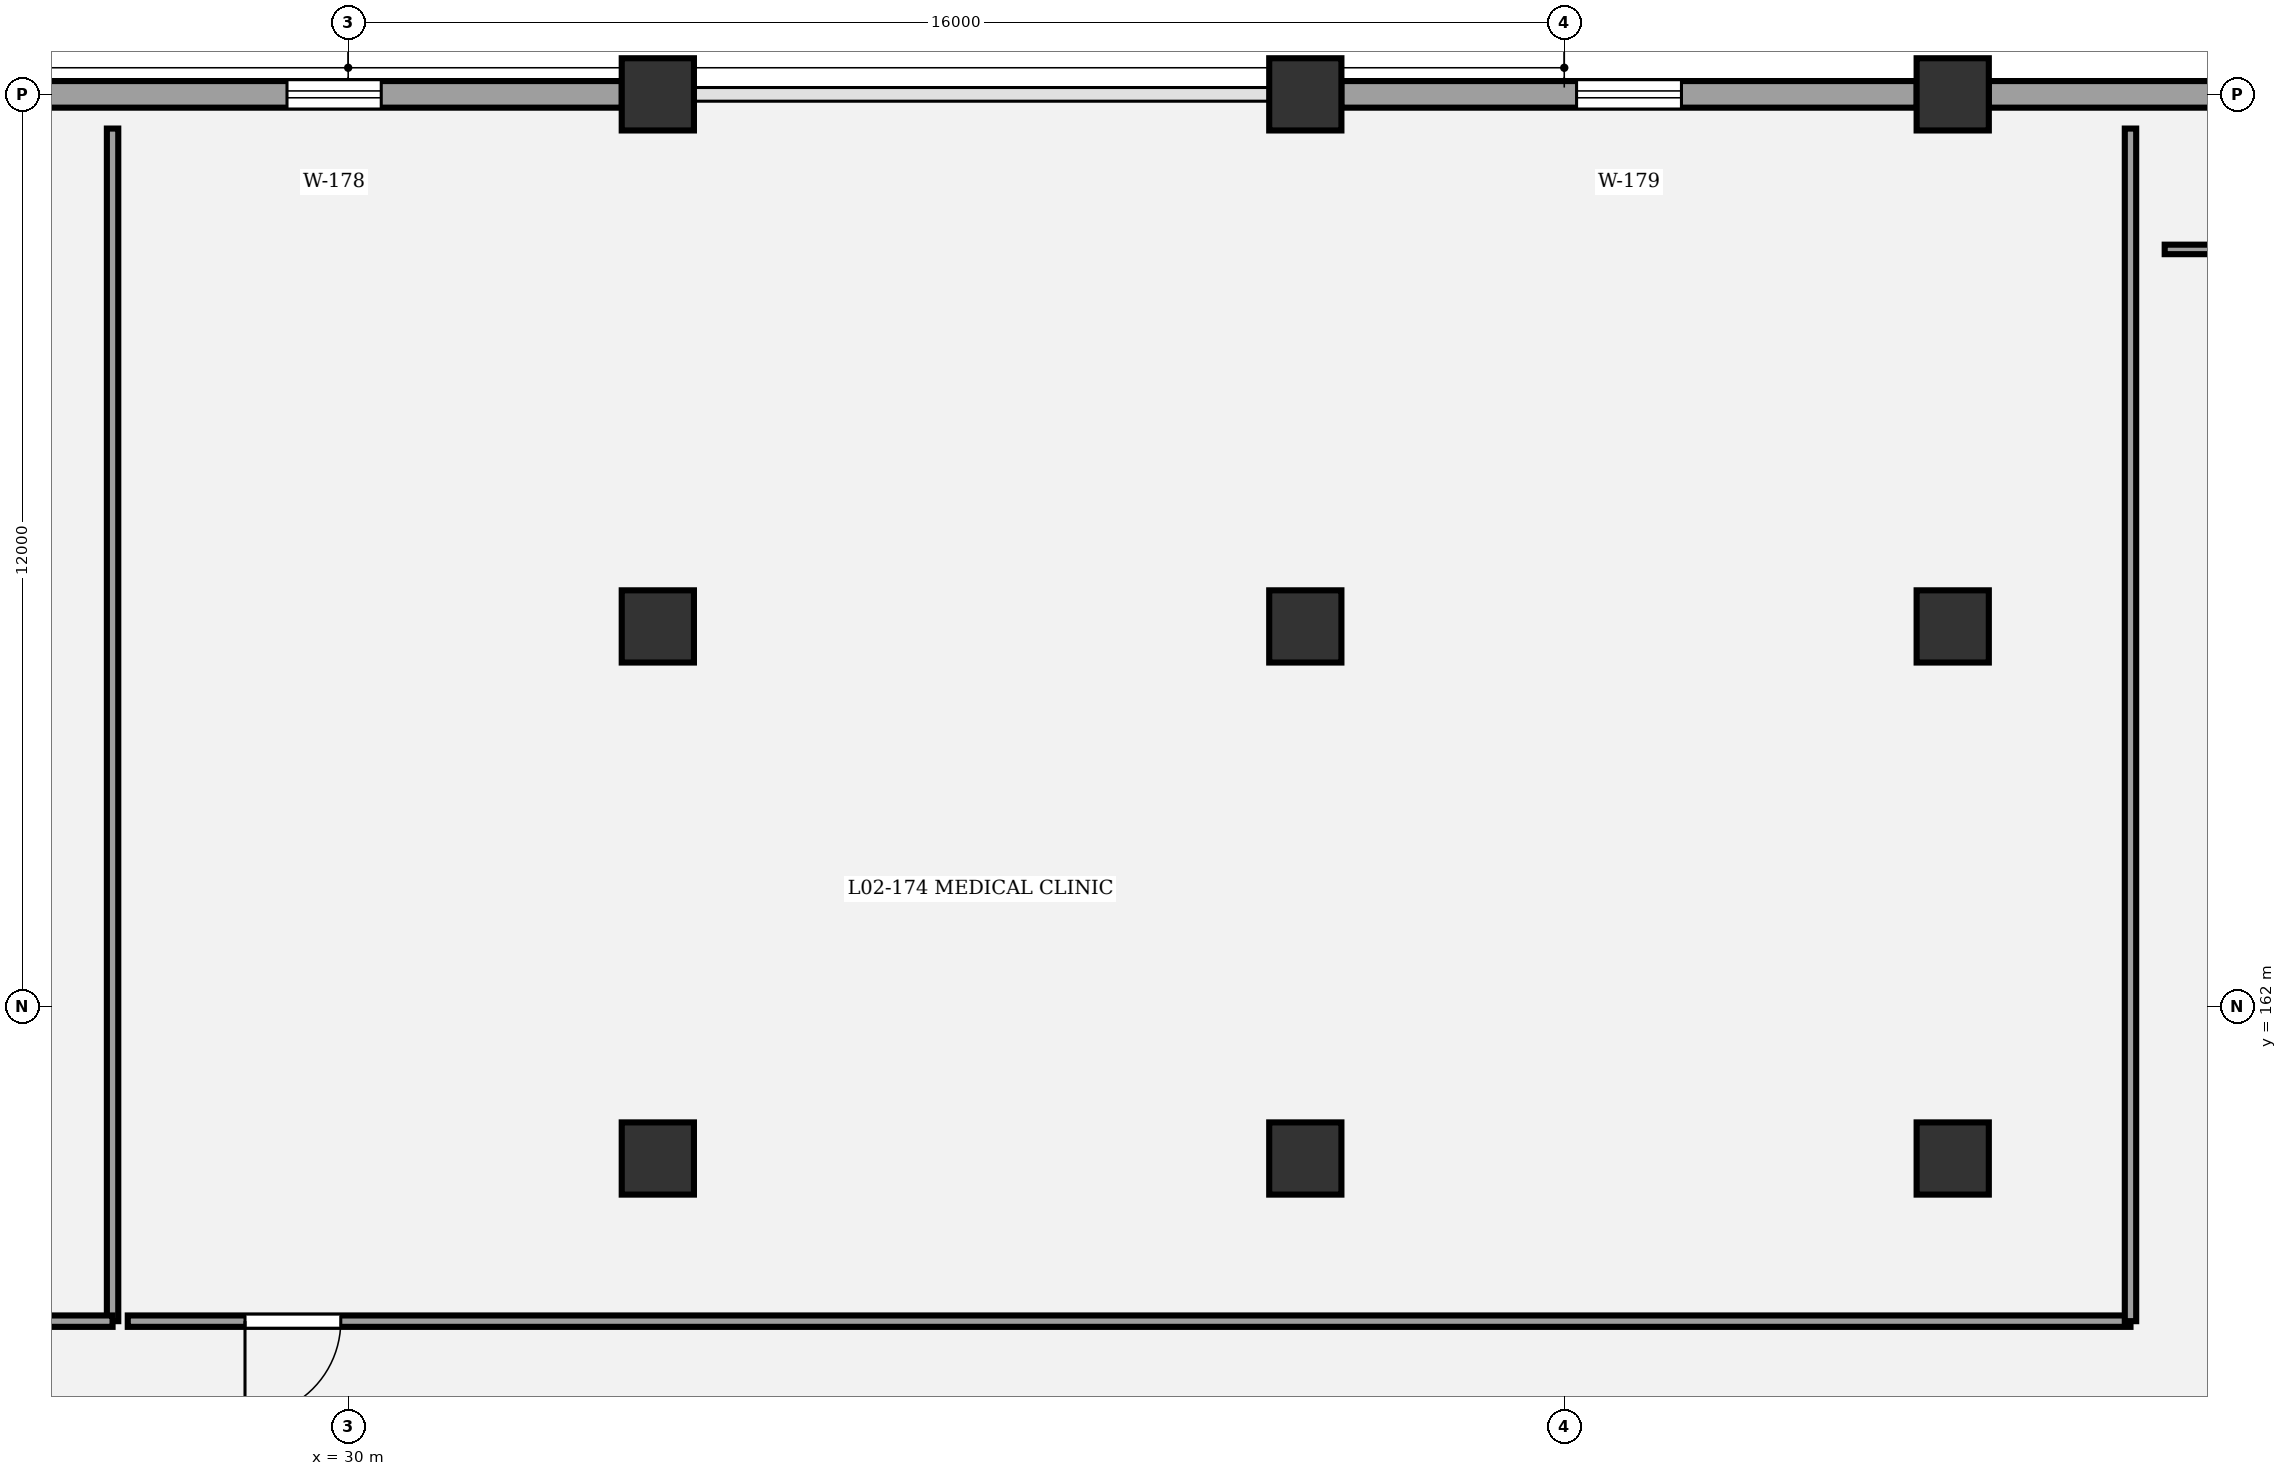
"""IFC4 building model, lengths in metres.
Left out: names, types, materials, properties, quantities, classifications, styles, units other than length and angle.
Written with IfcOpenShell. Run it as: python <this file> out.ifc"""

import sys

from ifc_helpers import new_model, si_unit, direction, frame, frame_2d, origin, origin_2d, place, context, subcontext, project, spatial, rectangle, circle, extrude, element, fill, save


model = new_model("IFC4")
c1 = context("Model", 3, precision=1e-05, world=origin(), true_north=direction((0.0, 1.0)))
c2 = subcontext(c1, "Body", "Model", "MODEL_VIEW")
j1 = project(units=[si_unit("LENGTHUNIT", "METRE"), si_unit("PLANEANGLEUNIT", "RADIAN")], contexts=[c1])
p1 = place(None, origin())
s1 = spatial("IfcSite", under=j1, at=p1, CompositionType="ELEMENT")
p2 = place(p1, origin())
s2 = spatial("IfcBuilding", under=s1, at=p2, CompositionType="ELEMENT")
p3 = place(p2, frame((0.0, 0.0, 10.2)))
s3 = spatial("IfcBuildingStorey", under=s2, at=p3, CompositionType="ELEMENT", Elevation=10.2)
for number, where, z_axis, x_axis in (
    (1, (34.074, 160.0, 0.0), (0.0, 0.0, 1.0), (1.0, 0.0, 0.0)),
    (2, (34.074, 167.0, 0.0), (0.0, 0.0, 1.0), (1.0, 0.0, 0.0)),
    (3, (34.074, 174.0, 0.0), (0.0, 0.0, 1.0), (1.0, 0.0, 0.0)),
    (4, (42.593, 160.0, 0.0), (0.0, 0.0, 1.0), (1.0, 0.0, 0.0)),
    (5, (42.593, 167.0, 0.0), (0.0, 0.0, 1.0), (1.0, 0.0, 0.0)),
    (6, (42.593, 174.0, 0.0), (0.0, 0.0, 1.0), (1.0, 0.0, 0.0)),
    (7, (51.111, 160.0, 0.0), (0.0, 0.0, 1.0), (1.0, 0.0, 0.0)),
    (8, (51.111, 167.0, 0.0), (0.0, 0.0, 1.0), (1.0, 0.0, 0.0)),
    (9, (51.111, 174.0, 0.0), (0.0, 0.0, 1.0), (1.0, 0.0, 0.0)),
):
    element("IfcColumn", number, at=place(p3, frame(where, z_axis=z_axis, x_axis=x_axis)), inside=s3, PredefinedType="COLUMN", context=c2, shape_type="SweptSolid", body=[
        extrude(circle(Radius=0.475, at=origin_2d()), origin(), (0.0, 0.0, 1.0), 4.5),
    ])
p4 = place(p3, frame((26.029, 174.0, 0.0), z_axis=(0.0, 0.0, 1.0), x_axis=(1.0, 0.0, 0.0)))
e10 = element("IfcWall", 10, at=p4, inside=s3, PredefinedType="STANDARD", context=c2, shape_type="SweptSolid", body=[
    extrude(rectangle(XDim=7.572, YDim=0.35, at=frame_2d((3.786, 0.0))), origin(), (0.0, 0.0, 1.0), 3.26),
])
p5 = place(p4, frame((3.166, 0.0, 0.9)))
e11 = element("IfcOpeningElement", 11, at=p5, cuts=e10, PredefinedType="OPENING", context=c2, shape_type="SweptSolid", body=[
    extrude(rectangle(XDim=1.24, YDim=1.55, at=frame_2d((0.62, 0.775))), frame((0.0, 0.185, 0.0), z_axis=(0.0, -1.0, 0.0), x_axis=(1.0, 0.0, 0.0)), (0.0, 0.0, 1.0), 0.37),
])
p6 = place(p3, frame((43.066, 174.0, 0.0), z_axis=(0.0, 0.0, 1.0), x_axis=(1.0, 0.0, 0.0)))
e12 = element("IfcWall", 12, at=p6, inside=s3, PredefinedType="STANDARD", context=c2, shape_type="SweptSolid", body=[
    extrude(rectangle(XDim=7.572, YDim=0.35, at=frame_2d((3.786, 0.0))), origin(), (0.0, 0.0, 1.0), 3.26),
])
p7 = place(p6, frame((3.096, 0.0, 0.9)))
e13 = element("IfcOpeningElement", 13, at=p7, cuts=e12, PredefinedType="OPENING", context=c2, shape_type="SweptSolid", body=[
    extrude(rectangle(XDim=1.38, YDim=1.55, at=frame_2d((0.69, 0.775))), frame((0.0, 0.185, 0.0), z_axis=(0.0, -1.0, 0.0), x_axis=(1.0, 0.0, 0.0)), (0.0, 0.0, 1.0), 0.37),
])
p8 = place(p3, frame((51.584, 174.0, 0.0), z_axis=(0.0, 0.0, 1.0), x_axis=(1.0, 0.0, 0.0)))
e14 = element("IfcWall", 14, at=p8, inside=s3, PredefinedType="STANDARD", context=c2, shape_type="SweptSolid", body=[
    extrude(rectangle(XDim=7.573, YDim=0.35, at=frame_2d((3.787, 0.0))), origin(), (0.0, 0.0, 1.0), 3.26),
])
p9 = place(p8, frame((3.027, 0.0, 0.9)))
e15 = element("IfcOpeningElement", 15, at=p9, cuts=e14, PredefinedType="OPENING", context=c2, shape_type="SweptSolid", body=[
    extrude(rectangle(XDim=1.52, YDim=1.55, at=frame_2d((0.76, 0.775))), frame((0.0, 0.185, 0.0), z_axis=(0.0, -1.0, 0.0), x_axis=(1.0, 0.0, 0.0)), (0.0, 0.0, 1.0), 0.37),
])
p10 = place(p3, frame((53.45, 157.86, 0.0), z_axis=(0.0, 0.0, 1.0), x_axis=(-1.0, 0.0, 0.0)))
e16 = element("IfcWall", 16, at=p10, inside=s3, PredefinedType="PARTITIONING", context=c2, shape_type="SweptSolid", body=[
    extrude(rectangle(XDim=26.35, YDim=0.15, at=frame_2d((13.175, 0.0))), origin(), (0.0, 0.0, 1.0), 3.25),
])
p11 = place(p10, frame((23.548, 0.0, 0.0)))
e17 = element("IfcOpeningElement", 17, at=p11, cuts=e16, PredefinedType="OPENING", context=c2, shape_type="SweptSolid", body=[
    extrude(rectangle(XDim=1.26, YDim=2.2, at=frame_2d((0.63, 1.1))), frame((0.0, 0.085, 0.0), z_axis=(0.0, -1.0, 0.0), x_axis=(1.0, 0.0, 0.0)), (0.0, 0.0, 1.0), 0.17),
])
p12 = place(p3, frame((80.0, 171.96, 0.0), z_axis=(0.0, 0.0, 1.0), x_axis=(-1.0, 0.0, 0.0)))
e18 = element("IfcWall", 18, at=p12, inside=s3, PredefinedType="PARTITIONING", context=c2, shape_type="SweptSolid", body=[
    extrude(rectangle(XDim=26.1, YDim=0.125, at=frame_2d((13.05, 0.0))), origin(), (0.0, 0.0, 1.0), 3.25),
])
p13 = place(p12, frame((15.959, 0.0, 0.0)))
e19 = element("IfcOpeningElement", 19, at=p13, cuts=e18, PredefinedType="OPENING", context=c2, shape_type="SweptSolid", body=[
    extrude(rectangle(XDim=1.4, YDim=2.2, at=frame_2d((0.7, 1.1))), frame((0.0, 0.073, 0.0), z_axis=(0.0, -1.0, 0.0), x_axis=(1.0, 0.0, 0.0)), (0.0, 0.0, 1.0), 0.145),
])
p14 = place(p3, frame((26.9, 173.55, 0.0), z_axis=(0.0, 0.0, 1.0), x_axis=(0.0, -1.0, 0.0)))
e20 = element("IfcWall", 20, at=p14, inside=s3, PredefinedType="PARTITIONING", context=c2, shape_type="SweptSolid", body=[
    extrude(rectangle(XDim=15.69, YDim=0.15, at=frame_2d((7.845, 0.0))), origin(), (0.0, 0.0, 1.0), 3.25),
])
p15 = place(p3, frame((26.9, 157.86, 0.0), z_axis=(0.0, 0.0, 1.0), x_axis=(-1.0, 0.0, 0.0)))
e21 = element("IfcWall", 21, at=p15, inside=s3, PredefinedType="PARTITIONING", context=c2, shape_type="SweptSolid", body=[
    extrude(rectangle(XDim=13.4, YDim=0.15, at=frame_2d((6.7, 0.0))), origin(), (0.0, 0.0, 1.0), 3.25),
])
p16 = place(p3, frame((53.45, 173.55, 0.0), z_axis=(0.0, 0.0, 1.0), x_axis=(0.0, -1.0, 0.0)))
e22 = element("IfcWall", 22, at=p16, inside=s3, PredefinedType="PARTITIONING", context=c2, shape_type="SweptSolid", body=[
    extrude(rectangle(XDim=15.69, YDim=0.15, at=frame_2d((7.845, 0.0))), origin(), (0.0, 0.0, 1.0), 3.25),
])
p17 = place(p5, origin())
e23 = element("IfcWindow", 23, at=p17, inside=s3, PartitioningType="SINGLE_PANEL", PredefinedType="WINDOW", context=c2, shape_type="SweptSolid", body=[
    extrude(rectangle(XDim=1.24, YDim=1.55, at=frame_2d((0.62, 0.775))), frame((0.0, 0.03, 0.0), z_axis=(0.0, -1.0, 0.0), x_axis=(1.0, 0.0, 0.0)), (0.0, 0.0, 1.0), 0.06),
])
fill(e11, e23)
p18 = place(p7, origin())
e24 = element("IfcWindow", 24, at=p18, inside=s3, PartitioningType="SINGLE_PANEL", PredefinedType="WINDOW", context=c2, shape_type="SweptSolid", body=[
    extrude(rectangle(XDim=1.38, YDim=1.55, at=frame_2d((0.69, 0.775))), frame((0.0, 0.03, 0.0), z_axis=(0.0, -1.0, 0.0), x_axis=(1.0, 0.0, 0.0)), (0.0, 0.0, 1.0), 0.06),
])
fill(e13, e24)
p19 = place(p11, origin())
e25 = element("IfcDoor", 25, at=p19, inside=s3, OperationType="SINGLE_SWING_RIGHT", PredefinedType="DOOR", context=c2, shape_type="SweptSolid", body=[
    extrude(rectangle(XDim=1.26, YDim=2.2, at=frame_2d((0.63, 1.1))), frame((0.0, 0.025, 0.0), z_axis=(0.0, -1.0, 0.0), x_axis=(1.0, 0.0, 0.0)), (0.0, 0.0, 1.0), 0.05),
])
fill(e17, e25)
save(model, sys.argv[1])
